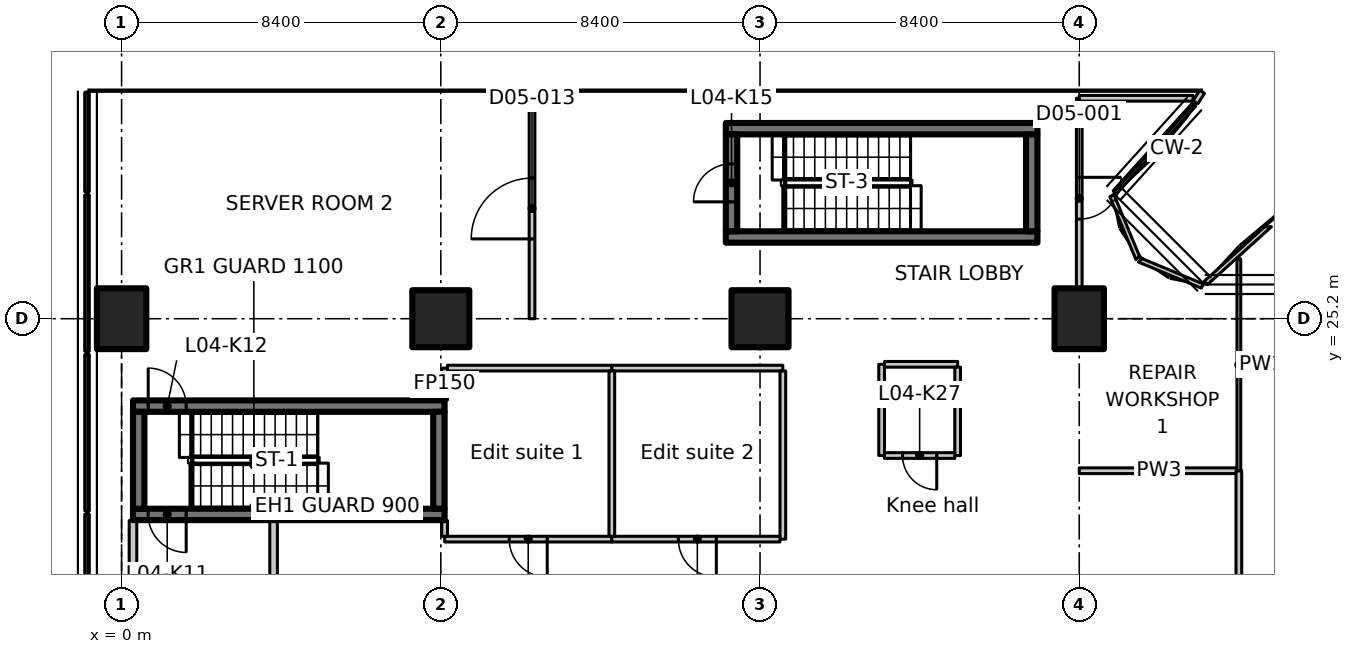
"""IFC4 building model, lengths in metres.
Left out: names, types, materials, properties, quantities, classifications, styles, units other than length and angle.
Written with IfcOpenShell. Run it as: python <this file> out.ifc"""

import sys

from ifc_helpers import new_model, si_unit, direction, frame, frame_2d, origin, origin_2d, place, context, subcontext, project, spatial, polyline, rectangle, outline, extrude, element, fill, save


model = new_model("IFC4")
c1 = context("Model", 3, precision=1e-05, world=origin(), true_north=direction((0.0, 1.0)))
c2 = subcontext(c1, "Body", "Model", "MODEL_VIEW")
j1 = project(units=[si_unit("LENGTHUNIT", "METRE"), si_unit("PLANEANGLEUNIT", "RADIAN")], contexts=[c1])
p1 = place(None, origin())
s1 = spatial("IfcSite", under=j1, at=p1, CompositionType="ELEMENT")
p2 = place(p1, origin())
s2 = spatial("IfcBuilding", under=s1, at=p2, CompositionType="ELEMENT")
p3 = place(p2, frame((0.0, 0.0, 27.5)))
s3 = spatial("IfcBuildingStorey", under=s2, at=p3, CompositionType="ELEMENT", Elevation=27.5)
p4 = place(p3, frame((0.0, 25.2, 0.0), z_axis=(0.0, 0.0, 1.0), x_axis=(1.0, 0.0, 0.0)))
e1 = element("IfcColumn", 1, at=p4, inside=s3, PredefinedType="COLUMN", context=c2, shape_type="SweptSolid", body=[
    extrude(rectangle(XDim=1.3, YDim=1.6, at=origin_2d()), origin(), (0.0, 0.0, 1.0), 4.25),
])
for number, where, z_axis, x_axis in (
    (2, (8.4, 25.2, 0.0), (0.0, 0.0, 1.0), (1.0, 0.0, 0.0)),
    (3, (16.8, 25.2, 0.0), (0.0, 0.0, 1.0), (1.0, 0.0, 0.0)),
):
    element("IfcColumn", number, at=place(p3, frame(where, z_axis=z_axis, x_axis=x_axis)), inside=s3, PredefinedType="COLUMN", context=c2, shape_type="SweptSolid", body=[
        extrude(rectangle(XDim=1.5, YDim=1.5, at=origin_2d()), origin(), (0.0, 0.0, 1.0), 4.25),
    ])
p5 = place(p3, frame((25.2, 25.2, 0.0), z_axis=(0.0, 0.0, 1.0), x_axis=(1.0, 0.0, 0.0)))
e4 = element("IfcColumn", 4, at=p5, inside=s3, PredefinedType="COLUMN", context=c2, shape_type="SweptSolid", body=[
    extrude(rectangle(XDim=1.3, YDim=1.6, at=origin_2d()), origin(), (0.0, 0.0, 1.0), 4.25),
])
p6 = place(p2, origin())
s4 = spatial("IfcBuildingStorey", under=s2, at=p6, CompositionType="ELEMENT", Elevation=0.0)
for number, where, z_axis, x_axis in (
    (5, (0.6, 32.4, -6.3), (0.0, 0.0, 1.0), (1.0, 0.0, 0.0)),
    (6, (9.0, 32.4, -6.3), (0.0, 0.0, 1.0), (1.0, 0.0, 0.0)),
):
    element("IfcWall", number, at=place(p6, frame(where, z_axis=z_axis, x_axis=x_axis)), inside=s4, PredefinedType="SOLIDWALL", context=c2, shape_type="SweptSolid", body=[
        extrude(rectangle(XDim=7.2, YDim=2.4, at=frame_2d((3.6, 0.0))), origin(), (0.0, 0.0, 1.0), 42.55),
    ])
p7 = place(p6, frame((17.4, 32.4, -6.3), z_axis=(0.0, 0.0, 1.0), x_axis=(1.0, 0.0, 0.0)))
e7 = element("IfcWall", 7, at=p7, inside=s4, PredefinedType="SOLIDWALL", context=c2, shape_type="SweptSolid", body=[
    extrude(rectangle(XDim=7.2, YDim=2.4, at=frame_2d((3.6, 0.0))), origin(), (0.0, 0.0, 1.0), 42.55),
])
p8 = place(p3, origin())
e8 = element("IfcWall", 8, at=p8, inside=s3, PredefinedType="SOLIDWALL", context=c2, shape_type="SweptSolid", body=[
    extrude(outline(polyline([(30.256, 27.619), (30.077, 27.619), (28.487, 26.182), (28.567, 26.093), (30.256, 27.619)])), origin(), (0.0, 0.0, 1.0), 4.25),
])
p9 = place(p3, origin())
e9 = element("IfcWall", 9, at=p9, inside=s3, PredefinedType="SOLIDWALL", context=c2, shape_type="SweptSolid", body=[
    extrude(outline(polyline([(28.412, 26.005), (28.458, 26.116), (26.847, 26.783), (26.755, 26.692), (28.412, 26.005)])), origin(), (0.0, 0.0, 1.0), 4.25),
])
p10 = place(p3, origin())
e10 = element("IfcWall", 10, at=p10, inside=s3, PredefinedType="SOLIDWALL", context=c2, shape_type="SweptSolid", body=[
    extrude(outline(polyline([(26.692, 26.755), (26.783, 26.847), (26.116, 28.458), (26.005, 28.412), (26.692, 26.755)])), origin(), (0.0, 0.0, 1.0), 4.25),
])
p11 = place(p3, origin())
e11 = element("IfcWall", 11, at=p11, inside=s3, PredefinedType="SOLIDWALL", context=c2, shape_type="SweptSolid", body=[
    extrude(outline(polyline([(26.093, 28.567), (26.182, 28.487), (28.267, 30.795), (28.167, 30.862), (26.093, 28.567)])), origin(), (0.0, 0.0, 1.0), 4.25),
])
p12 = place(p3, origin())
e12 = element("IfcWall", 12, at=p12, inside=s3, PredefinedType="SOLIDWALL", context=c2, shape_type="SweptSolid", body=[
    extrude(outline(polyline([(-0.97, 28.545), (-0.85, 28.545), (-0.85, 31.155), (-0.97, 31.155), (-0.97, 28.545)])), origin(), (0.0, 0.0, 1.0), 4.25),
])
p13 = place(p3, origin())
e13 = element("IfcWall", 13, at=p13, inside=s3, PredefinedType="SOLIDWALL", context=c2, shape_type="SweptSolid", body=[
    extrude(outline(polyline([(-0.97, 24.345), (-0.85, 24.345), (-0.85, 28.455), (-0.97, 28.455), (-0.97, 24.345)])), origin(), (0.0, 0.0, 1.0), 4.25),
])
p14 = place(p3, origin())
e14 = element("IfcWall", 14, at=p14, inside=s3, PredefinedType="SOLIDWALL", context=c2, shape_type="SweptSolid", body=[
    extrude(outline(polyline([(-0.97, 20.145), (-0.85, 20.145), (-0.85, 24.255), (-0.97, 24.255), (-0.97, 20.145)])), origin(), (0.0, 0.0, 1.0), 4.25),
])
p15 = place(p3, origin())
e15 = element("IfcWall", 15, at=p15, inside=s3, PredefinedType="SOLIDWALL", context=c2, shape_type="SweptSolid", body=[
    extrude(outline(polyline([(-0.97, 15.945), (-0.85, 15.945), (-0.85, 20.055), (-0.97, 20.055), (-0.97, 15.945)])), origin(), (0.0, 0.0, 1.0), 4.25),
])
p16 = place(p3, frame((8.5, 20.05, 0.0), z_axis=(0.0, 0.0, 1.0), x_axis=(-1.0, 0.0, 0.0)))
e16 = element("IfcWall", 16, at=p16, inside=s3, PredefinedType="SHEAR", context=c2, shape_type="SweptSolid", body=[
    extrude(rectangle(XDim=8.2, YDim=0.3, at=frame_2d((4.1, 0.0))), origin(), (0.0, 0.0, 1.0), 4.25),
])
p17 = place(p16, frame((6.8, 0.0, 0.0)))
e17 = element("IfcOpeningElement", 17, at=p17, cuts=e16, PredefinedType="OPENING", context=c2, shape_type="SweptSolid", body=[
    extrude(rectangle(XDim=1.0, YDim=2.1, at=frame_2d((0.5, 1.05))), frame((0.0, 0.16, 0.0), z_axis=(0.0, -1.0, 0.0), x_axis=(1.0, 0.0, 0.0)), (0.0, 0.0, 1.0), 0.32),
])
p18 = place(p3, frame((0.3, 22.9, 0.0), z_axis=(0.0, 0.0, 1.0), x_axis=(1.0, 0.0, 0.0)))
e18 = element("IfcWall", 18, at=p18, inside=s3, PredefinedType="SHEAR", context=c2, shape_type="SweptSolid", body=[
    extrude(rectangle(XDim=8.2, YDim=0.3, at=frame_2d((4.1, 0.0))), origin(), (0.0, 0.0, 1.0), 4.25),
])
p19 = place(p18, frame((0.4, 0.0, 0.0)))
e19 = element("IfcOpeningElement", 19, at=p19, cuts=e18, PredefinedType="OPENING", context=c2, shape_type="SweptSolid", body=[
    extrude(rectangle(XDim=1.0, YDim=2.1, at=frame_2d((0.5, 1.05))), frame((0.0, 0.16, 0.0), z_axis=(0.0, -1.0, 0.0), x_axis=(1.0, 0.0, 0.0)), (0.0, 0.0, 1.0), 0.32),
])
for number, where, z_axis, x_axis in (
    (20, (0.45, 20.2, 0.0), (0.0, 0.0, 1.0), (0.0, 1.0, 0.0)),
    (21, (8.35, 20.2, 0.0), (0.0, 0.0, 1.0), (0.0, 1.0, 0.0)),
):
    element("IfcWall", number, at=place(p3, frame(where, z_axis=z_axis, x_axis=x_axis)), inside=s3, PredefinedType="SHEAR", context=c2, shape_type="SweptSolid", body=[
        extrude(rectangle(XDim=2.55, YDim=0.3, at=frame_2d((1.275, 0.0))), origin(), (0.0, 0.0, 1.0), 4.25),
    ])
for number, where, z_axis, x_axis in (
    (22, (15.9, 27.35, 0.0), (0.0, 0.0, 1.0), (1.0, 0.0, 0.0)),
    (23, (15.9, 30.2, 0.0), (0.0, 0.0, 1.0), (1.0, 0.0, 0.0)),
):
    element("IfcWall", number, at=place(p3, frame(where, z_axis=z_axis, x_axis=x_axis)), inside=s3, PredefinedType="SHEAR", context=c2, shape_type="SweptSolid", body=[
        extrude(rectangle(XDim=8.2, YDim=0.3, at=frame_2d((4.1, 0.0))), origin(), (0.0, 0.0, 1.0), 4.25),
    ])
p20 = place(p3, frame((16.05, 27.5, 0.0), z_axis=(0.0, 0.0, 1.0), x_axis=(0.0, 1.0, 0.0)))
e24 = element("IfcWall", 24, at=p20, inside=s3, PredefinedType="SHEAR", context=c2, shape_type="SweptSolid", body=[
    extrude(rectangle(XDim=2.55, YDim=0.3, at=frame_2d((1.275, 0.0))), origin(), (0.0, 0.0, 1.0), 4.25),
])
p21 = place(p20, frame((0.775, 0.0, 0.0)))
e25 = element("IfcOpeningElement", 25, at=p21, cuts=e24, PredefinedType="OPENING", context=c2, shape_type="SweptSolid", body=[
    extrude(rectangle(XDim=1.0, YDim=2.1, at=frame_2d((0.5, 1.05))), frame((0.0, 0.16, 0.0), z_axis=(0.0, -1.0, 0.0), x_axis=(1.0, 0.0, 0.0)), (0.0, 0.0, 1.0), 0.32),
])
p22 = place(p3, frame((23.95, 27.5, 0.0), z_axis=(0.0, 0.0, 1.0), x_axis=(0.0, 1.0, 0.0)))
e26 = element("IfcWall", 26, at=p22, inside=s3, PredefinedType="SHEAR", context=c2, shape_type="SweptSolid", body=[
    extrude(rectangle(XDim=2.55, YDim=0.3, at=frame_2d((1.275, 0.0))), origin(), (0.0, 0.0, 1.0), 4.25),
])
p23 = place(p3, frame((0.3, 16.812, 0.0), z_axis=(0.0, 0.0, 1.0), x_axis=(0.0, 1.0, 0.0)))
e27 = element("IfcWall", 27, at=p23, inside=s3, PredefinedType="PARTITIONING", context=c2, shape_type="SweptSolid", body=[
    extrude(rectangle(XDim=3.076, YDim=0.2, at=frame_2d((1.538, 0.0))), origin(), (0.0, 0.0, 1.0), 3.88),
])
p24 = place(p3, frame((4.0, 19.888, 0.0), z_axis=(0.0, 0.0, 1.0), x_axis=(0.0, -1.0, 0.0)))
e28 = element("IfcWall", 28, at=p24, inside=s3, PredefinedType="PARTITIONING", context=c2, shape_type="SweptSolid", body=[
    extrude(rectangle(XDim=3.076, YDim=0.2, at=frame_2d((1.538, 0.0))), origin(), (0.0, 0.0, 1.0), 4.25),
])
p25 = place(p24, frame((1.488, 0.0, 0.0)))
e29 = element("IfcOpeningElement", 29, at=p25, cuts=e28, PredefinedType="OPENING", context=c2, shape_type="SweptSolid", body=[
    extrude(rectangle(XDim=1.0, YDim=2.1, at=frame_2d((0.5, 1.05))), frame((0.0, 0.11, 0.0), z_axis=(0.0, -1.0, 0.0), x_axis=(1.0, 0.0, 0.0)), (0.0, 0.0, 1.0), 0.22),
])
p26 = place(p3, frame((12.9, 19.4, 0.0), z_axis=(0.0, 0.0, 1.0), x_axis=(-1.0, 0.0, 0.0)))
e30 = element("IfcWall", 30, at=p26, inside=s3, PredefinedType="PARTITIONING", context=c2, shape_type="SweptSolid", body=[
    extrude(rectangle(XDim=4.4, YDim=0.15, at=frame_2d((2.2, 0.0))), origin(), (0.0, 0.0, 1.0), 4.25),
])
p27 = place(p26, frame((1.7, 0.0, 0.0)))
e31 = element("IfcOpeningElement", 31, at=p27, cuts=e30, PredefinedType="OPENING", context=c2, shape_type="SweptSolid", body=[
    extrude(rectangle(XDim=1.0, YDim=2.1, at=frame_2d((0.5, 1.05))), frame((0.0, 0.085, 0.0), z_axis=(0.0, -1.0, 0.0), x_axis=(1.0, 0.0, 0.0)), (0.0, 0.0, 1.0), 0.17),
])
p28 = place(p3, frame((8.5, 19.475, 0.0), z_axis=(0.0, 0.0, 1.0), x_axis=(0.0, 1.0, 0.0)))
e32 = element("IfcWall", 32, at=p28, inside=s3, PredefinedType="PARTITIONING", context=c2, shape_type="SweptSolid", body=[
    extrude(rectangle(XDim=0.413, YDim=0.15, at=frame_2d((0.207, 0.0))), origin(), (0.0, 0.0, 1.0), 4.25),
])
p29 = place(p3, frame((8.5, 23.062, 0.0), z_axis=(0.0, 0.0, 1.0), x_axis=(0.0, 1.0, 0.0)))
e33 = element("IfcWall", 33, at=p29, inside=s3, PredefinedType="PARTITIONING", context=c2, shape_type="SweptSolid", body=[
    extrude(rectangle(XDim=0.838, YDim=0.15, at=frame_2d((0.419, 0.0))), origin(), (0.0, 0.0, 1.0), 4.25),
])
p30 = place(p3, frame((8.575, 23.9, 0.0), z_axis=(0.0, 0.0, 1.0), x_axis=(1.0, 0.0, 0.0)))
e34 = element("IfcWall", 34, at=p30, inside=s3, PredefinedType="PARTITIONING", context=c2, shape_type="SweptSolid", body=[
    extrude(rectangle(XDim=4.325, YDim=0.15, at=frame_2d((2.163, 0.0))), origin(), (0.0, 0.0, 1.0), 4.25),
])
p31 = place(p3, frame((12.9, 23.9, 0.0), z_axis=(0.0, 0.0, 1.0), x_axis=(1.0, 0.0, 0.0)))
e35 = element("IfcWall", 35, at=p31, inside=s3, PredefinedType="PARTITIONING", context=c2, shape_type="SweptSolid", body=[
    extrude(rectangle(XDim=4.5, YDim=0.15, at=frame_2d((2.25, 0.0))), origin(), (0.0, 0.0, 1.0), 4.25),
])
p32 = place(p3, frame((17.4, 23.825, 0.0), z_axis=(0.0, 0.0, 1.0), x_axis=(0.0, -1.0, 0.0)))
e36 = element("IfcWall", 36, at=p32, inside=s3, PredefinedType="PARTITIONING", context=c2, shape_type="SweptSolid", body=[
    extrude(rectangle(XDim=4.425, YDim=0.15, at=frame_2d((2.212, 0.0))), origin(), (0.0, 0.0, 1.0), 4.25),
])
p33 = place(p3, frame((17.325, 19.4, 0.0), z_axis=(0.0, 0.0, 1.0), x_axis=(-1.0, 0.0, 0.0)))
e37 = element("IfcWall", 37, at=p33, inside=s3, PredefinedType="PARTITIONING", context=c2, shape_type="SweptSolid", body=[
    extrude(rectangle(XDim=4.425, YDim=0.15, at=frame_2d((2.212, 0.0))), origin(), (0.0, 0.0, 1.0), 4.25),
])
p34 = place(p33, frame((1.675, 0.0, 0.0)))
e38 = element("IfcOpeningElement", 38, at=p34, cuts=e37, PredefinedType="OPENING", context=c2, shape_type="SweptSolid", body=[
    extrude(rectangle(XDim=1.0, YDim=2.1, at=frame_2d((0.5, 1.05))), frame((0.0, 0.085, 0.0), z_axis=(0.0, -1.0, 0.0), x_axis=(1.0, 0.0, 0.0)), (0.0, 0.0, 1.0), 0.17),
])
p35 = place(p3, frame((12.9, 23.825, 0.0), z_axis=(0.0, 0.0, 1.0), x_axis=(0.0, -1.0, 0.0)))
e39 = element("IfcWall", 39, at=p35, inside=s3, PredefinedType="PARTITIONING", context=c2, shape_type="SweptSolid", body=[
    extrude(rectangle(XDim=4.35, YDim=0.15, at=frame_2d((2.175, 0.0))), origin(), (0.0, 0.0, 1.0), 4.25),
])
p36 = place(p3, frame((20.0, 21.6, 0.0), z_axis=(0.0, 0.0, 1.0), x_axis=(0.0, 1.0, 0.0)))
e40 = element("IfcWall", 40, at=p36, inside=s3, PredefinedType="PARTITIONING", context=c2, shape_type="SweptSolid", body=[
    extrude(rectangle(XDim=2.4, YDim=0.15, at=frame_2d((1.2, 0.0))), origin(), (0.0, 0.0, 1.0), 4.25),
])
p37 = place(p3, frame((20.075, 24.0, 0.0), z_axis=(0.0, 0.0, 1.0), x_axis=(1.0, 0.0, 0.0)))
e41 = element("IfcWall", 41, at=p37, inside=s3, PredefinedType="PARTITIONING", context=c2, shape_type="SweptSolid", body=[
    extrude(rectangle(XDim=1.925, YDim=0.15, at=frame_2d((0.962, 0.0))), origin(), (0.0, 0.0, 1.0), 4.25),
])
p38 = place(p3, frame((22.0, 23.925, 0.0), z_axis=(0.0, 0.0, 1.0), x_axis=(0.0, -1.0, 0.0)))
e42 = element("IfcWall", 42, at=p38, inside=s3, PredefinedType="PARTITIONING", context=c2, shape_type="SweptSolid", body=[
    extrude(rectangle(XDim=2.325, YDim=0.15, at=frame_2d((1.163, 0.0))), origin(), (0.0, 0.0, 1.0), 4.25),
])
p39 = place(p3, frame((21.925, 21.6, 0.0), z_axis=(0.0, 0.0, 1.0), x_axis=(-1.0, 0.0, 0.0)))
e43 = element("IfcWall", 43, at=p39, inside=s3, PredefinedType="PARTITIONING", context=c2, shape_type="SweptSolid", body=[
    extrude(rectangle(XDim=1.85, YDim=0.15, at=frame_2d((0.925, 0.0))), origin(), (0.0, 0.0, 1.0), 4.25),
])
p40 = place(p39, frame((0.475, 0.0, 0.0)))
e44 = element("IfcOpeningElement", 44, at=p40, cuts=e43, PredefinedType="OPENING", context=c2, shape_type="SweptSolid", body=[
    extrude(rectangle(XDim=0.9, YDim=2.1, at=frame_2d((0.45, 1.05))), frame((0.0, 0.085, 0.0), z_axis=(0.0, -1.0, 0.0), x_axis=(1.0, 0.0, 0.0)), (0.0, 0.0, 1.0), 0.17),
])
p41 = place(p3, frame((25.2, 21.2, 0.0), z_axis=(0.0, 0.0, 1.0), x_axis=(1.0, 0.0, 0.0)))
e45 = element("IfcWall", 45, at=p41, inside=s3, PredefinedType="PARTITIONING", context=c2, shape_type="SweptSolid", body=[
    extrude(rectangle(XDim=4.2, YDim=0.15, at=frame_2d((2.1, 0.0))), origin(), (0.0, 0.0, 1.0), 4.23),
])
p42 = place(p3, frame((29.4, 21.2, 0.0), z_axis=(0.0, 0.0, 1.0), x_axis=(0.0, -1.0, 0.0)))
e46 = element("IfcWall", 46, at=p42, inside=s3, PredefinedType="PARTITIONING", context=c2, shape_type="SweptSolid", body=[
    extrude(rectangle(XDim=8.2, YDim=0.15, at=frame_2d((4.1, 0.0))), origin(), (0.0, 0.0, 1.0), 4.23),
])
p43 = place(p3, frame((29.4, 26.776, 0.0), z_axis=(0.0, 0.0, 1.0), x_axis=(0.0, -1.0, 0.0)))
e47 = element("IfcWall", 47, at=p43, inside=s3, PredefinedType="PARTITIONING", context=c2, shape_type="SweptSolid", body=[
    extrude(outline(polyline([(0.0, 0.0), (5.576, 0.0), (5.576, 4.23), (2.026, 4.23), (2.024, 3.88), (1.128, 3.88), (1.126, 4.23), (0.0, 4.23), (0.0, 0.0)])), frame((0.0, 0.05, 0.0), z_axis=(0.0, -1.0, 0.0), x_axis=(1.0, 0.0, 0.0)), (0.0, 0.0, 1.0), 0.1),
])
p44 = place(p3, frame((25.2, 31.0, 0.0), z_axis=(0.0, 0.0, 1.0), x_axis=(0.0, -1.0, 0.0)))
e48 = element("IfcWall", 48, at=p44, inside=s3, PredefinedType="PARTITIONING", context=c2, shape_type="SweptSolid", body=[
    extrude(rectangle(XDim=4.98, YDim=0.15, at=frame_2d((2.49, 0.0))), origin(), (0.0, 0.0, 1.0), 4.23),
])
p45 = place(p44, frame((2.08, 0.0, 0.0)))
e49 = element("IfcOpeningElement", 49, at=p45, cuts=e48, PredefinedType="OPENING", context=c2, shape_type="SweptSolid", body=[
    extrude(rectangle(XDim=1.1, YDim=2.1, at=frame_2d((0.55, 1.05))), frame((0.0, 0.085, 0.0), z_axis=(0.0, -1.0, 0.0), x_axis=(1.0, 0.0, 0.0)), (0.0, 0.0, 1.0), 0.17),
])
p46 = place(p3, frame((25.2, 31.0, 0.0), z_axis=(0.0, 0.0, 1.0), x_axis=(1.0, 0.0, 0.0)))
e50 = element("IfcWall", 50, at=p46, inside=s3, PredefinedType="PARTITIONING", context=c2, shape_type="SweptSolid", body=[
    extrude(rectangle(XDim=2.994, YDim=0.15, at=frame_2d((1.497, 0.0))), origin(), (0.0, 0.0, 1.0), 4.23),
])
p47 = place(p3, frame((28.432, 31.168, 0.0), z_axis=(0.0, 0.0, 1.0), x_axis=(-0.541288698077, -0.840836812547, 0.0)))
e51 = element("IfcWall", 51, at=p47, inside=s3, PredefinedType="PARTITIONING", context=c2, shape_type="SweptSolid", body=[
    extrude(rectangle(XDim=0.325, YDim=0.15, at=frame_2d((0.163, 0.0))), origin(), (0.0, 0.0, 1.0), 4.23),
])
p48 = place(p3, frame((10.8, 25.2, 0.0), z_axis=(0.0, 0.0, 1.0), x_axis=(0.0, 1.0, 0.0)))
e52 = element("IfcWall", 52, at=p48, inside=s3, PredefinedType="PARTITIONING", context=c2, shape_type="SweptSolid", body=[
    extrude(rectangle(XDim=6.0, YDim=0.15, at=frame_2d((3.0, 0.0))), origin(), (0.0, 0.0, 1.0), 4.23),
])
p49 = place(p48, frame((2.1, 0.0, 0.0)))
e53 = element("IfcOpeningElement", 53, at=p49, cuts=e52, PredefinedType="OPENING", context=c2, shape_type="SweptSolid", body=[
    extrude(rectangle(XDim=1.6, YDim=2.1, at=frame_2d((0.8, 1.05))), frame((0.0, 0.085, 0.0), z_axis=(0.0, -1.0, 0.0), x_axis=(1.0, 0.0, 0.0)), (0.0, 0.0, 1.0), 0.17),
])
p50 = place(p17, origin())
e54 = element("IfcDoor", 54, at=p50, inside=s3, OperationType="SINGLE_SWING_LEFT", PredefinedType="DOOR", context=c2, shape_type="SweptSolid", body=[
    extrude(rectangle(XDim=1.0, YDim=2.1, at=frame_2d((0.5, 1.05))), frame((0.0, 0.025, 0.0), z_axis=(0.0, -1.0, 0.0), x_axis=(1.0, 0.0, 0.0)), (0.0, 0.0, 1.0), 0.05),
])
fill(e17, e54)
p51 = place(p19, origin())
e55 = element("IfcDoor", 55, at=p51, inside=s3, OperationType="SINGLE_SWING_RIGHT", PredefinedType="DOOR", context=c2, shape_type="SweptSolid", body=[
    extrude(rectangle(XDim=1.0, YDim=2.1, at=frame_2d((0.5, 1.05))), frame((0.0, 0.025, 0.0), z_axis=(0.0, -1.0, 0.0), x_axis=(1.0, 0.0, 0.0)), (0.0, 0.0, 1.0), 0.05),
])
fill(e19, e55)
p52 = place(p21, origin())
e56 = element("IfcDoor", 56, at=p52, inside=s3, OperationType="SINGLE_SWING_LEFT", PredefinedType="DOOR", context=c2, shape_type="SweptSolid", body=[
    extrude(rectangle(XDim=1.0, YDim=2.1, at=frame_2d((0.5, 1.05))), frame((0.0, 0.025, 0.0), z_axis=(0.0, -1.0, 0.0), x_axis=(1.0, 0.0, 0.0)), (0.0, 0.0, 1.0), 0.05),
])
fill(e25, e56)
p53 = place(p40, origin())
e57 = element("IfcDoor", 57, at=p53, inside=s3, OperationType="SINGLE_SWING_LEFT", PredefinedType="DOOR", context=c2, shape_type="SweptSolid", body=[
    extrude(rectangle(XDim=0.9, YDim=2.1, at=frame_2d((0.45, 1.05))), frame((0.0, 0.025, 0.0), z_axis=(0.0, -1.0, 0.0), x_axis=(1.0, 0.0, 0.0)), (0.0, 0.0, 1.0), 0.05),
])
fill(e44, e57)
p54 = place(p27, origin())
e58 = element("IfcDoor", 58, at=p54, inside=s3, OperationType="SINGLE_SWING_RIGHT", PredefinedType="DOOR", context=c2, shape_type="SweptSolid", body=[
    extrude(rectangle(XDim=1.0, YDim=2.1, at=frame_2d((0.5, 1.05))), frame((0.0, 0.025, 0.0), z_axis=(0.0, -1.0, 0.0), x_axis=(1.0, 0.0, 0.0)), (0.0, 0.0, 1.0), 0.05),
])
fill(e31, e58)
p55 = place(p34, origin())
e59 = element("IfcDoor", 59, at=p55, inside=s3, OperationType="SINGLE_SWING_LEFT", PredefinedType="DOOR", context=c2, shape_type="SweptSolid", body=[
    extrude(rectangle(XDim=1.0, YDim=2.1, at=frame_2d((0.5, 1.05))), frame((0.0, 0.025, 0.0), z_axis=(0.0, -1.0, 0.0), x_axis=(1.0, 0.0, 0.0)), (0.0, 0.0, 1.0), 0.05),
])
fill(e38, e59)
p56 = place(p45, origin())
e60 = element("IfcDoor", 60, at=p56, inside=s3, OperationType="SINGLE_SWING_RIGHT", PredefinedType="DOOR", context=c2, shape_type="SweptSolid", body=[
    extrude(rectangle(XDim=1.1, YDim=2.1, at=frame_2d((0.55, 1.05))), frame((0.0, 0.025, 0.0), z_axis=(0.0, -1.0, 0.0), x_axis=(1.0, 0.0, 0.0)), (0.0, 0.0, 1.0), 0.05),
])
fill(e49, e60)
p57 = place(p49, origin())
e61 = element("IfcDoor", 61, at=p57, inside=s3, OperationType="DOUBLE_DOOR_SINGLE_SWING", PredefinedType="DOOR", context=c2, shape_type="SweptSolid", body=[
    extrude(rectangle(XDim=1.6, YDim=2.1, at=frame_2d((0.8, 1.05))), frame((0.0, 0.025, 0.0), z_axis=(0.0, -1.0, 0.0), x_axis=(1.0, 0.0, 0.0)), (0.0, 0.0, 1.0), 0.05),
])
fill(e53, e61)
save(model, sys.argv[1])
